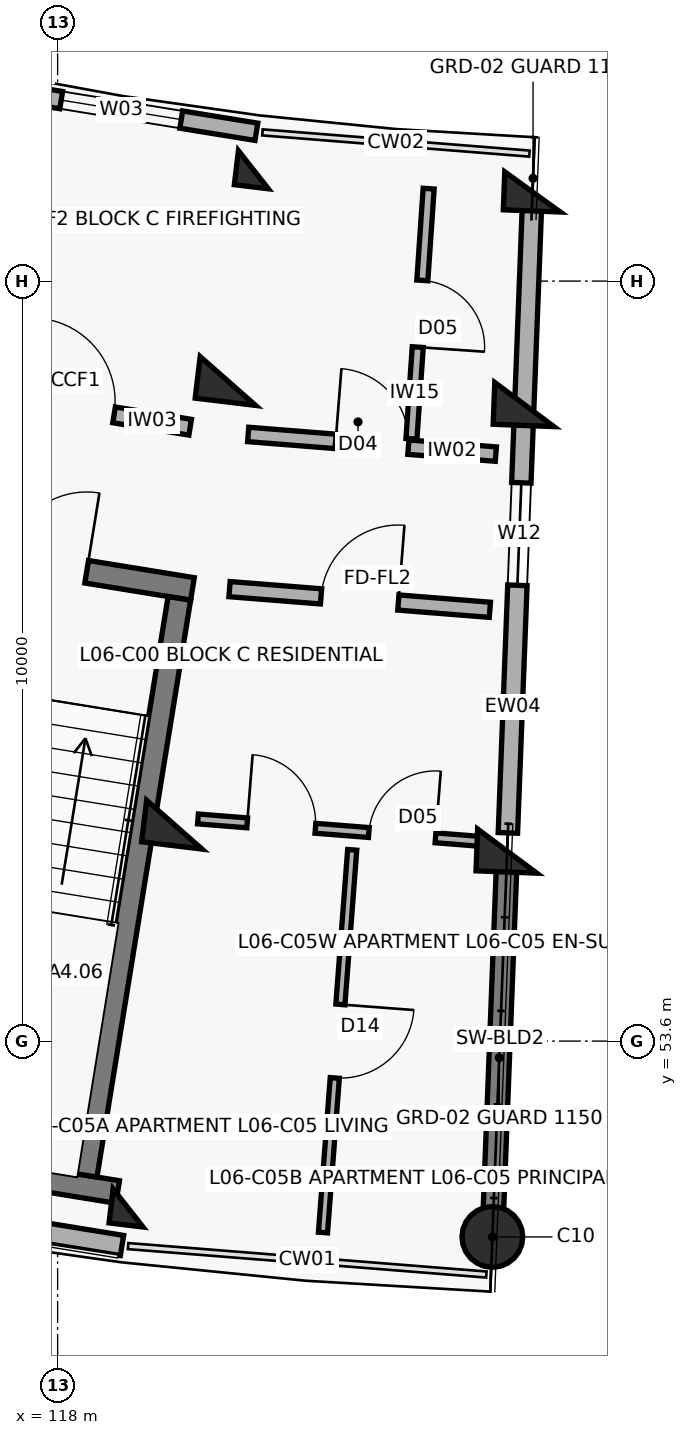
"""IFC4 building model, lengths in metres.
Left out: names, types, materials, properties, quantities, classifications, styles, units other than length and angle.
Written with IfcOpenShell. Run it as: python <this file> out.ifc"""

import sys

from ifc_helpers import new_model, si_unit, direction, frame, frame_2d, origin, origin_2d, place, context, subcontext, project, spatial, rectangle, circle, extrude, element, fill, save


model = new_model("IFC4")
c1 = context("Model", 3, precision=1e-05, world=origin(), true_north=direction((0.0, 1.0)))
c2 = subcontext(c1, "Body", "Model", "MODEL_VIEW")
j1 = project(units=[si_unit("LENGTHUNIT", "METRE"), si_unit("PLANEANGLEUNIT", "RADIAN")], contexts=[c1])
p1 = place(None, origin())
s1 = spatial("IfcSite", under=j1, at=p1, CompositionType="ELEMENT")
p2 = place(p1, origin())
s2 = spatial("IfcBuilding", under=s1, at=p2, CompositionType="ELEMENT")
p3 = place(p2, frame((0.0, 0.0, 20.5)))
s3 = spatial("IfcBuildingStorey", under=s2, at=p3, CompositionType="ELEMENT", Elevation=20.5)
p4 = place(p3, frame((120.575, 65.065, 0.0), z_axis=(0.0, 0.0, 1.0), x_axis=(-0.119790293837, -0.992799217114, 0.0)))
e1 = element("IfcColumn", 1, at=p4, inside=s3, PredefinedType="COLUMN", context=c2, shape_type="SweptSolid", body=[
    extrude(rectangle(XDim=0.45, YDim=0.45, at=origin_2d()), origin(), (0.0, 0.0, 1.0), 3.1),
])
for number, where, z_axis, x_axis in (
    (2, (120.24, 62.285, 0.0), (0.0, 0.0, 1.0), (-0.12, -0.993, 0.0)),
    (3, (119.535, 56.448, 0.0), (0.0, 0.0, 1.0), (-0.12, -0.993, 0.0)),
):
    element("IfcColumn", number, at=place(p3, frame(where, z_axis=z_axis, x_axis=x_axis)), inside=s3, PredefinedType="COLUMN", context=c2, shape_type="SweptSolid", body=[
        extrude(rectangle(XDim=0.55, YDim=0.8, at=origin_2d()), origin(), (0.0, 0.0, 1.0), 3.1),
    ])
p5 = place(p3, frame((118.927, 51.404, 0.0), z_axis=(0.0, 0.0, 1.0), x_axis=(-0.119790293837, -0.992799217114, 0.0)))
e4 = element("IfcColumn", 4, at=p5, inside=s3, PredefinedType="COLUMN", context=c2, shape_type="SweptSolid", body=[
    extrude(rectangle(XDim=0.45, YDim=0.45, at=origin_2d()), origin(), (0.0, 0.0, 1.0), 3.1),
])
p6 = place(p3, frame((124.248, 64.773, 0.0), z_axis=(0.0, 0.0, 1.0), x_axis=(-0.038387809088, -0.999262916411, 0.0)))
e5 = element("IfcColumn", 5, at=p6, inside=s3, PredefinedType="COLUMN", context=c2, shape_type="SweptSolid", body=[
    extrude(rectangle(XDim=0.5, YDim=0.75, at=origin_2d()), origin(), (0.0, 0.0, 1.0), 3.1),
])
for number, where, z_axis, x_axis in (
    (6, (124.14, 61.975, 0.0), (0.0, 0.0, 1.0), (-0.038, -0.999, 0.0)),
    (7, (123.915, 56.1, 0.0), (0.0, 0.0, 1.0), (-0.038, -0.999, 0.0)),
):
    element("IfcColumn", number, at=place(p3, frame(where, z_axis=z_axis, x_axis=x_axis)), inside=s3, PredefinedType="COLUMN", context=c2, shape_type="SweptSolid", body=[
        extrude(rectangle(XDim=0.55, YDim=0.8, at=origin_2d()), origin(), (0.0, 0.0, 1.0), 3.1),
    ])
p7 = place(p3, frame((123.72, 51.023, 0.0), z_axis=(0.0, 0.0, 1.0), x_axis=(-0.038387809088, -0.999262916411, 0.0)))
e8 = element("IfcColumn", 8, at=p7, inside=s3, PredefinedType="COLUMN", context=c2, shape_type="SweptSolid", body=[
    extrude(circle(Radius=0.4, at=origin_2d()), origin(), (0.0, 0.0, 1.0), 3.1),
])
p8 = place(p3, frame((123.908, 55.92, 0.0), z_axis=(0.0, 0.0, 1.0), x_axis=(-0.038381471406, -0.99926315986, 0.0)))
e9 = element("IfcWall", 9, at=p8, inside=s3, PredefinedType="SHEAR", context=c2, shape_type="SweptSolid", body=[
    extrude(rectangle(XDim=4.72, YDim=0.27, at=frame_2d((2.36, 0.0))), origin(), (0.0, 0.0, 1.0), 2.86),
])
p9 = place(p3, frame((114.1, 51.681, 0.0), z_axis=(0.0, 0.0, 1.0), x_axis=(0.987080750493, -0.160223568819, 0.0)))
e10 = element("IfcWall", 10, at=p9, inside=s3, PredefinedType="SOLIDWALL", context=c2, shape_type="SweptSolid", body=[
    extrude(rectangle(XDim=4.809, YDim=0.268, at=frame_2d((2.404, 0.0))), origin(), (0.0, 0.0, 1.0), 2.25),
])
p10 = place(p3, frame((117.058, 66.142, 0.0), z_axis=(0.0, 0.0, 1.0), x_axis=(0.987080874485, -0.160222804952, 0.0)))
e11 = element("IfcWall", 11, at=p10, inside=s3, PredefinedType="SOLIDWALL", context=c2, shape_type="SweptSolid", body=[
    extrude(rectangle(XDim=3.604, YDim=0.23, at=frame_2d((1.802, 0.0))), origin(), (0.0, 0.0, 1.0), 2.25),
])
p11 = place(p10, frame((1.002, 0.0, 0.32)))
e12 = element("IfcOpeningElement", 12, at=p11, cuts=e11, PredefinedType="OPENING", context=c2, shape_type="SweptSolid", body=[
    extrude(rectangle(XDim=1.6, YDim=1.5, at=frame_2d((0.8, 0.75))), frame((0.0, 0.125, 0.0), z_axis=(0.0, -1.0, 0.0), x_axis=(1.0, 0.0, 0.0)), (0.0, 0.0, 1.0), 0.25),
])
p12 = place(p3, frame((124.239, 64.533, 0.0), z_axis=(0.0, 0.0, 1.0), x_axis=(-0.038407966241, -0.999262141847, 0.0)))
e13 = element("IfcWall", 13, at=p12, inside=s3, PredefinedType="SOLIDWALL", context=c2, shape_type="SweptSolid", body=[
    extrude(rectangle(XDim=8.2, YDim=0.255, at=frame_2d((4.1, 0.0))), origin(), (0.0, 0.0, 1.0), 2.18),
])
p13 = place(p12, frame((3.59, 0.0, 0.75)))
e14 = element("IfcOpeningElement", 14, at=p13, cuts=e13, PredefinedType="OPENING", context=c2, shape_type="SweptSolid", body=[
    extrude(rectangle(XDim=1.35, YDim=1.35, at=frame_2d((0.675, 0.675))), frame((0.0, 0.137, 0.0), z_axis=(0.0, -1.0, 0.0), x_axis=(1.0, 0.0, 0.0)), (0.0, 0.0, 1.0), 0.275),
])
p14 = place(p3, frame((115.954, 60.169, 0.0), z_axis=(0.0, 0.0, 1.0), x_axis=(0.987077443397, -0.160243941341, 0.0)))
e15 = element("IfcWall", 15, at=p14, inside=s3, PredefinedType="SHEAR", context=c2, shape_type="SweptSolid", body=[
    extrude(rectangle(XDim=3.87, YDim=0.3, at=frame_2d((1.935, 0.0))), origin(), (0.0, 0.0, 1.0), 3.1),
])
p15 = place(p14, frame((1.41, 0.0, 0.0)))
e16 = element("IfcOpeningElement", 16, at=p15, cuts=e15, PredefinedType="OPENING", context=c2, shape_type="SweptSolid", body=[
    extrude(rectangle(XDim=1.05, YDim=2.15, at=frame_2d((0.525, 1.075))), frame((0.0, 0.16, 0.0), z_axis=(0.0, -1.0, 0.0), x_axis=(1.0, 0.0, 0.0)), (0.0, 0.0, 1.0), 0.32),
])
p16 = place(p3, frame((114.377, 52.331, 0.0), z_axis=(0.0, 0.0, 1.0), x_axis=(0.987077474317, -0.16024375088, 0.0)))
e17 = element("IfcWall", 17, at=p16, inside=s3, PredefinedType="SHEAR", context=c2, shape_type="SweptSolid", body=[
    extrude(rectangle(XDim=4.47, YDim=0.3, at=frame_2d((2.235, 0.0))), origin(), (0.0, 0.0, 1.0), 3.1),
])
p17 = place(p3, frame((119.602, 59.425, 0.0), z_axis=(0.0, 0.0, 1.0), x_axis=(-0.160201584773, -0.987084318706, 0.0)))
e18 = element("IfcWall", 18, at=p17, inside=s3, PredefinedType="SHEAR", context=c2, shape_type="SweptSolid", body=[
    extrude(rectangle(XDim=7.69, YDim=0.3, at=frame_2d((3.845, 0.0))), origin(), (0.0, 0.0, 1.0), 3.1),
])
p18 = place(p3, frame((116.656, 62.178, 0.0), z_axis=(0.0, 0.0, 1.0), x_axis=(0.987083140276, -0.16020884552, 0.0)))
e19 = element("IfcWall", 19, at=p18, inside=s3, PredefinedType="SOLIDWALL", context=c2, shape_type="SweptSolid", body=[
    extrude(rectangle(XDim=3.129, YDim=0.21, at=frame_2d((1.564, 0.0))), origin(), (0.0, 0.0, 1.0), 2.08),
])
p19 = place(p18, frame((1.014, 0.0, 0.0)))
e20 = element("IfcOpeningElement", 20, at=p19, cuts=e19, PredefinedType="OPENING", context=c2, shape_type="SweptSolid", body=[
    extrude(rectangle(XDim=1.1, YDim=2.15, at=frame_2d((0.55, 1.075))), frame((0.0, 0.115, 0.0), z_axis=(0.0, -1.0, 0.0), x_axis=(1.0, 0.0, 0.0)), (0.0, 0.0, 1.0), 0.23),
])
p20 = place(p3, frame((120.261, 59.547, 0.0), z_axis=(0.0, 0.0, 1.0), x_axis=(0.996862545573, -0.079152165058, 0.0)))
e21 = element("IfcWall", 21, at=p20, inside=s3, PredefinedType="SOLIDWALL", context=c2, shape_type="SweptSolid", body=[
    extrude(rectangle(XDim=3.436, YDim=0.2, at=frame_2d((1.718, 0.0))), origin(), (0.0, 0.0, 1.0), 2.08),
])
p21 = place(p20, frame((1.208, 0.0, 0.0)))
e22 = element("IfcOpeningElement", 22, at=p21, cuts=e21, PredefinedType="OPENING", context=c2, shape_type="SweptSolid", body=[
    extrude(rectangle(XDim=1.02, YDim=2.15, at=frame_2d((0.51, 1.075))), frame((0.0, 0.11, 0.0), z_axis=(0.0, -1.0, 0.0), x_axis=(1.0, 0.0, 0.0)), (0.0, 0.0, 1.0), 0.22),
])
p22 = place(p3, frame((120.507, 61.582, 0.0), z_axis=(0.0, 0.0, 1.0), x_axis=(0.996860715473, -0.07917521043, 0.0)))
e23 = element("IfcWall", 23, at=p22, inside=s3, PredefinedType="SOLIDWALL", context=c2, shape_type="SweptSolid", body=[
    extrude(rectangle(XDim=3.269, YDim=0.19, at=frame_2d((1.634, 0.0))), origin(), (0.0, 0.0, 1.0), 2.08),
])
p23 = place(p22, frame((1.154, 0.0, 0.0)))
e24 = element("IfcOpeningElement", 24, at=p23, cuts=e23, PredefinedType="OPENING", context=c2, shape_type="SweptSolid", body=[
    extrude(rectangle(XDim=0.96, YDim=2.1, at=frame_2d((0.48, 1.05))), frame((0.0, 0.105, 0.0), z_axis=(0.0, -1.0, 0.0), x_axis=(1.0, 0.0, 0.0)), (0.0, 0.0, 1.0), 0.21),
])
p24 = place(p3, frame((122.881, 64.816, 0.0), z_axis=(0.0, 0.0, 1.0), x_axis=(-0.068581194944, -0.997645538105, 0.0)))
e25 = element("IfcWall", 25, at=p24, inside=s3, PredefinedType="PARTITIONING", context=c2, shape_type="SweptSolid", body=[
    extrude(rectangle(XDim=3.3, YDim=0.145, at=frame_2d((1.65, 0.0))), origin(), (0.0, 0.0, 1.0), 2.08),
])
p25 = place(p24, frame((1.21, 0.0, 0.0)))
e26 = element("IfcOpeningElement", 26, at=p25, cuts=e25, PredefinedType="OPENING", context=c2, shape_type="SweptSolid", body=[
    extrude(rectangle(XDim=0.88, YDim=2.1, at=frame_2d((0.44, 1.05))), frame((0.0, 0.083, 0.0), z_axis=(0.0, -1.0, 0.0), x_axis=(1.0, 0.0, 0.0)), (0.0, 0.0, 1.0), 0.165),
])
p26 = place(p3, frame((119.846, 56.523, 0.0), z_axis=(0.0, 0.0, 1.0), x_axis=(0.996863292793, -0.079142753818, 0.0)))
e27 = element("IfcWall", 27, at=p26, inside=s3, PredefinedType="PARTITIONING", context=c2, shape_type="SweptSolid", body=[
    extrude(rectangle(XDim=3.785, YDim=0.13, at=frame_2d((1.893, 0.0))), origin(), (0.0, 0.0, 1.0), 2.08),
])
p27 = place(p26, frame((0.65, 0.0, 0.0)))
e28 = element("IfcOpeningElement", 28, at=p27, cuts=e27, PredefinedType="OPENING", context=c2, shape_type="SweptSolid", body=[
    extrude(rectangle(XDim=0.9, YDim=2.1, at=frame_2d((0.45, 1.05))), frame((0.0, 0.075, 0.0), z_axis=(0.0, -1.0, 0.0), x_axis=(1.0, 0.0, 0.0)), (0.0, 0.0, 1.0), 0.15),
])
p28 = place(p26, frame((2.255, 0.0, 0.0)))
e29 = element("IfcOpeningElement", 29, at=p28, cuts=e27, PredefinedType="OPENING", context=c2, shape_type="SweptSolid", body=[
    extrude(rectangle(XDim=0.88, YDim=2.1, at=frame_2d((0.44, 1.05))), frame((0.0, 0.075, 0.0), z_axis=(0.0, -1.0, 0.0), x_axis=(1.0, 0.0, 0.0)), (0.0, 0.0, 1.0), 0.15),
])
p29 = place(p3, frame((121.875, 56.116, 0.0), z_axis=(0.0, 0.0, 1.0), x_axis=(-0.076141951799, -0.997096987848, 0.0)))
e30 = element("IfcWall", 30, at=p29, inside=s3, PredefinedType="PARTITIONING", context=c2, shape_type="SweptSolid", body=[
    extrude(rectangle(XDim=5.05, YDim=0.12, at=frame_2d((2.525, 0.0))), origin(), (0.0, 0.0, 1.0), 2.08),
])
p30 = place(p29, frame((2.04, 0.0, 0.0)))
e31 = element("IfcOpeningElement", 31, at=p30, cuts=e30, PredefinedType="OPENING", context=c2, shape_type="SweptSolid", body=[
    extrude(rectangle(XDim=0.97, YDim=2.1, at=frame_2d((0.485, 1.05))), frame((0.0, 0.07, 0.0), z_axis=(0.0, -1.0, 0.0), x_axis=(1.0, 0.0, 0.0)), (0.0, 0.0, 1.0), 0.14),
])
p31 = place(p11, origin())
e32 = element("IfcWindow", 32, at=p31, inside=s3, PartitioningType="DOUBLE_PANEL_VERTICAL", PredefinedType="WINDOW", context=c2, shape_type="SweptSolid", body=[
    extrude(rectangle(XDim=1.6, YDim=1.5, at=frame_2d((0.8, 0.75))), frame((0.0, 0.03, 0.0), z_axis=(0.0, -1.0, 0.0), x_axis=(1.0, 0.0, 0.0)), (0.0, 0.0, 1.0), 0.06),
])
fill(e12, e32)
p32 = place(p13, origin())
e33 = element("IfcWindow", 33, at=p32, inside=s3, PartitioningType="DOUBLE_PANEL_VERTICAL", PredefinedType="WINDOW", context=c2, shape_type="SweptSolid", body=[
    extrude(rectangle(XDim=1.35, YDim=1.35, at=frame_2d((0.675, 0.675))), frame((0.0, 0.03, 0.0), z_axis=(0.0, -1.0, 0.0), x_axis=(1.0, 0.0, 0.0)), (0.0, 0.0, 1.0), 0.06),
])
fill(e14, e33)
p33 = place(p15, origin())
e34 = element("IfcDoor", 34, at=p33, inside=s3, OperationType="SINGLE_SWING_RIGHT", PredefinedType="DOOR", context=c2, shape_type="SweptSolid", body=[
    extrude(rectangle(XDim=1.05, YDim=2.15, at=frame_2d((0.525, 1.075))), frame((0.0, 0.025, 0.0), z_axis=(0.0, -1.0, 0.0), x_axis=(1.0, 0.0, 0.0)), (0.0, 0.0, 1.0), 0.05),
])
fill(e16, e34)
p34 = place(p19, origin())
e35 = element("IfcDoor", 35, at=p34, inside=s3, OperationType="SINGLE_SWING_LEFT", PredefinedType="DOOR", context=c2, shape_type="SweptSolid", body=[
    extrude(rectangle(XDim=1.1, YDim=2.15, at=frame_2d((0.55, 1.075))), frame((0.0, 0.025, 0.0), z_axis=(0.0, -1.0, 0.0), x_axis=(1.0, 0.0, 0.0)), (0.0, 0.0, 1.0), 0.05),
])
fill(e20, e35)
p35 = place(p21, origin())
e36 = element("IfcDoor", 36, at=p35, inside=s3, OperationType="SINGLE_SWING_RIGHT", PredefinedType="DOOR", context=c2, shape_type="SweptSolid", body=[
    extrude(rectangle(XDim=1.02, YDim=2.15, at=frame_2d((0.51, 1.075))), frame((0.0, 0.025, 0.0), z_axis=(0.0, -1.0, 0.0), x_axis=(1.0, 0.0, 0.0)), (0.0, 0.0, 1.0), 0.05),
])
fill(e22, e36)
p36 = place(p23, origin())
e37 = element("IfcDoor", 37, at=p36, inside=s3, OperationType="SINGLE_SWING_LEFT", PredefinedType="DOOR", context=c2, shape_type="SweptSolid", body=[
    extrude(rectangle(XDim=0.96, YDim=2.1, at=frame_2d((0.48, 1.05))), frame((0.0, 0.025, 0.0), z_axis=(0.0, -1.0, 0.0), x_axis=(1.0, 0.0, 0.0)), (0.0, 0.0, 1.0), 0.05),
])
fill(e24, e37)
p37 = place(p25, origin())
e38 = element("IfcDoor", 38, at=p37, inside=s3, OperationType="SINGLE_SWING_RIGHT", PredefinedType="DOOR", context=c2, shape_type="SweptSolid", body=[
    extrude(rectangle(XDim=0.88, YDim=2.1, at=frame_2d((0.44, 1.05))), frame((0.0, 0.025, 0.0), z_axis=(0.0, -1.0, 0.0), x_axis=(1.0, 0.0, 0.0)), (0.0, 0.0, 1.0), 0.05),
])
fill(e26, e38)
p38 = place(p27, origin())
e39 = element("IfcDoor", 39, at=p38, inside=s3, OperationType="SINGLE_SWING_LEFT", PredefinedType="DOOR", context=c2, shape_type="SweptSolid", body=[
    extrude(rectangle(XDim=0.9, YDim=2.1, at=frame_2d((0.45, 1.05))), frame((0.0, 0.025, 0.0), z_axis=(0.0, -1.0, 0.0), x_axis=(1.0, 0.0, 0.0)), (0.0, 0.0, 1.0), 0.05),
])
fill(e28, e39)
p39 = place(p28, origin())
e40 = element("IfcDoor", 40, at=p39, inside=s3, OperationType="SINGLE_SWING_RIGHT", PredefinedType="DOOR", context=c2, shape_type="SweptSolid", body=[
    extrude(rectangle(XDim=0.88, YDim=2.1, at=frame_2d((0.44, 1.05))), frame((0.0, 0.025, 0.0), z_axis=(0.0, -1.0, 0.0), x_axis=(1.0, 0.0, 0.0)), (0.0, 0.0, 1.0), 0.05),
])
fill(e29, e40)
p40 = place(p30, origin())
e41 = element("IfcDoor", 41, at=p40, inside=s3, OperationType="SINGLE_SWING_LEFT", PredefinedType="DOOR", context=c2, shape_type="SweptSolid", body=[
    extrude(rectangle(XDim=0.97, YDim=2.1, at=frame_2d((0.485, 1.05))), frame((0.0, 0.025, 0.0), z_axis=(0.0, -1.0, 0.0), x_axis=(1.0, 0.0, 0.0)), (0.0, 0.0, 1.0), 0.05),
])
fill(e31, e41)
save(model, sys.argv[1])
